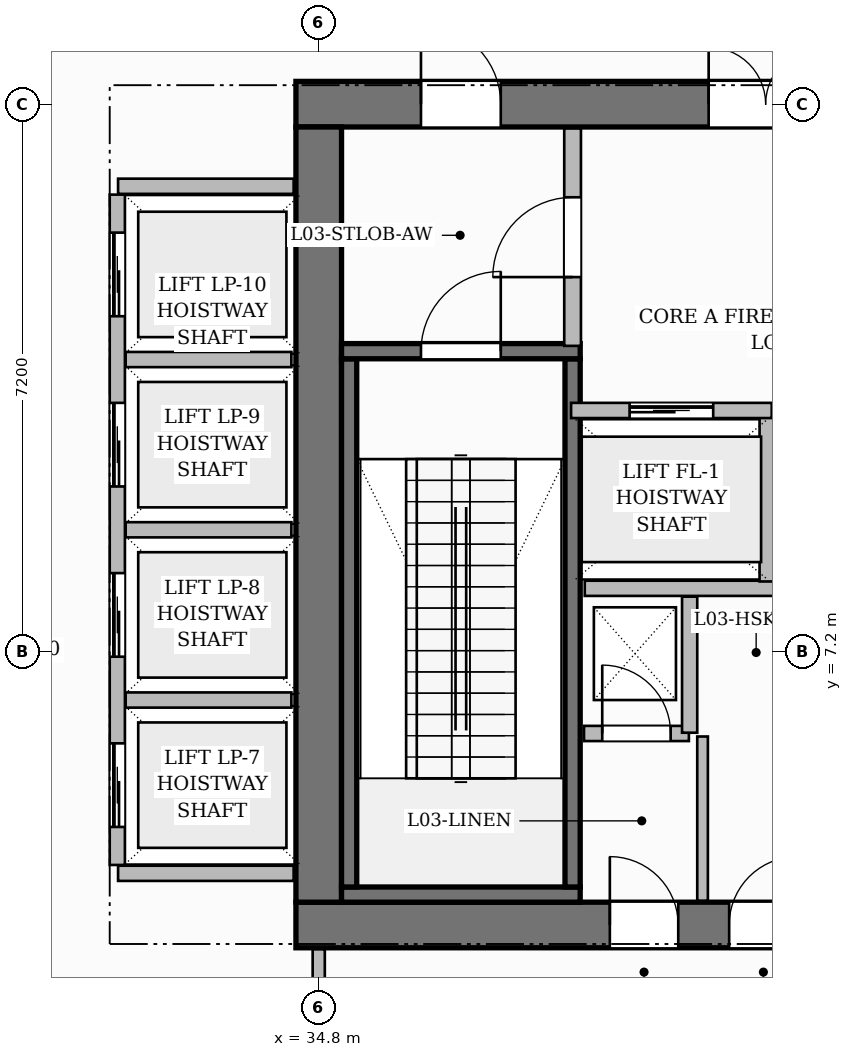
"""IFC4 building model, lengths in metres.
Left out: names, types, materials, properties, quantities, classifications, styles, units other than length and angle.
Written with IfcOpenShell. Run it as: python <this file> out.ifc"""

import sys

from ifc_helpers import new_model, si_unit, direction, frame, frame_2d, origin, place, context, subcontext, project, spatial, rectangle, extrude, source, transform, mapped, element, fill, save


model = new_model("IFC4")
c1 = context("Model", 3, precision=1e-05, world=origin(), true_north=direction((0.0, 1.0)))
c2 = subcontext(c1, "Body", "Model", "MODEL_VIEW")
j1 = project(units=[si_unit("LENGTHUNIT", "METRE"), si_unit("PLANEANGLEUNIT", "RADIAN")], contexts=[c1])
p1 = place(None, origin())
s1 = spatial("IfcSite", under=j1, at=p1, CompositionType="ELEMENT")
p2 = place(p1, origin())
s2 = spatial("IfcBuilding", under=s1, at=p2, CompositionType="ELEMENT")
p3 = place(p2, frame((0.0, 0.0, 16.2)))
s3 = spatial("IfcBuildingStorey", under=s2, at=p3, CompositionType="ELEMENT", Elevation=16.2)
p4 = place(p3, frame((34.5, 3.6, 0.0), z_axis=(0.0, 0.0, 1.0), x_axis=(1.0, 0.0, 0.0)))
e1 = element("IfcWall", 1, at=p4, inside=s3, PredefinedType="SHEAR", context=c2, shape_type="SweptSolid", body=[
    extrude(rectangle(XDim=15.6, YDim=0.6, at=frame_2d((7.8, 0.0))), origin(), (0.0, 0.0, 1.0), 5.4),
])
p5 = place(p4, frame((4.13, 0.0, 0.0)))
e2 = element("IfcOpeningElement", 2, at=p5, cuts=e1, PredefinedType="OPENING", context=c2, shape_type="SweptSolid", body=[
    extrude(rectangle(XDim=0.9, YDim=2.1, at=frame_2d((0.45, 1.05))), frame((0.0, 0.31, 0.0), z_axis=(0.0, -1.0, 0.0), x_axis=(1.0, 0.0, 0.0)), (0.0, 0.0, 1.0), 0.62),
])
p6 = place(p4, frame((5.7, 0.0, 0.0)))
e3 = element("IfcOpeningElement", 3, at=p6, cuts=e1, PredefinedType="OPENING", context=c2, shape_type="SweptSolid", body=[
    extrude(rectangle(XDim=0.9, YDim=2.1, at=frame_2d((0.45, 1.05))), frame((0.0, 0.31, 0.0), z_axis=(0.0, -1.0, 0.0), x_axis=(1.0, 0.0, 0.0)), (0.0, 0.0, 1.0), 0.62),
])
p7 = place(p4, frame((7.3, 0.0, 0.0)))
e4 = element("IfcOpeningElement", 4, at=p7, cuts=e1, PredefinedType="OPENING", context=c2, shape_type="SweptSolid", body=[
    extrude(rectangle(XDim=0.9, YDim=2.1, at=frame_2d((0.45, 1.05))), frame((0.0, 0.31, 0.0), z_axis=(0.0, -1.0, 0.0), x_axis=(1.0, 0.0, 0.0)), (0.0, 0.0, 1.0), 0.62),
])
p8 = place(p3, frame((34.5, 14.4, 0.0), z_axis=(0.0, 0.0, 1.0), x_axis=(1.0, 0.0, 0.0)))
e5 = element("IfcWall", 5, at=p8, inside=s3, PredefinedType="SHEAR", context=c2, shape_type="SweptSolid", body=[
    extrude(rectangle(XDim=15.6, YDim=0.6, at=frame_2d((7.8, 0.0))), origin(), (0.0, 0.0, 1.0), 5.4),
])
p9 = place(p8, frame((5.43, 0.0, 0.0)))
e6 = element("IfcOpeningElement", 6, at=p9, cuts=e5, PredefinedType="OPENING", context=c2, shape_type="SweptSolid", body=[
    extrude(rectangle(XDim=1.5, YDim=2.2, at=frame_2d((0.75, 1.1))), frame((0.0, 0.31, 0.0), z_axis=(0.0, -1.0, 0.0), x_axis=(1.0, 0.0, 0.0)), (0.0, 0.0, 1.0), 0.62),
])
p10 = place(p8, frame((1.645, 0.0, 0.0)))
e7 = element("IfcOpeningElement", 7, at=p10, cuts=e5, PredefinedType="OPENING", context=c2, shape_type="SweptSolid", body=[
    extrude(rectangle(XDim=1.05, YDim=2.15, at=frame_2d((0.525, 1.075))), frame((0.0, 0.31, 0.0), z_axis=(0.0, -1.0, 0.0), x_axis=(1.0, 0.0, 0.0)), (0.0, 0.0, 1.0), 0.62),
])
p11 = place(p8, frame((11.275, 0.0, 0.0)))
e8 = element("IfcOpeningElement", 8, at=p11, cuts=e5, PredefinedType="OPENING", context=c2, shape_type="SweptSolid", body=[
    extrude(rectangle(XDim=1.05, YDim=2.15, at=frame_2d((0.525, 1.075))), frame((0.0, 0.31, 0.0), z_axis=(0.0, -1.0, 0.0), x_axis=(1.0, 0.0, 0.0)), (0.0, 0.0, 1.0), 0.62),
])
p12 = place(p3, frame((34.8, 3.9, 0.0), z_axis=(0.0, 0.0, 1.0), x_axis=(0.0, 1.0, 0.0)))
e9 = element("IfcWall", 9, at=p12, inside=s3, PredefinedType="SHEAR", context=c2, shape_type="SweptSolid", body=[
    extrude(rectangle(XDim=10.2, YDim=0.6, at=frame_2d((5.1, 0.0))), origin(), (0.0, 0.0, 1.0), 5.4),
])
p13 = place(p3, frame((35.1, 4.0, 0.0), z_axis=(0.0, 0.0, 1.0), x_axis=(1.0, 0.0, 0.0)))
e10 = element("IfcWall", 10, at=p13, inside=s3, PredefinedType="SHEAR", context=c2, shape_type="SweptSolid", body=[
    extrude(rectangle(XDim=3.14, YDim=0.2, at=frame_2d((1.57, 0.0))), origin(), (0.0, 0.0, 1.0), 5.4),
])
for number, where, z_axis, x_axis in (
    (11, (35.2, 4.1, 0.0), (0.0, 0.0, 1.0), (0.0, 1.0, 0.0)),
    (12, (38.14, 4.1, 0.0), (0.0, 0.0, 1.0), (0.0, 1.0, 0.0)),
):
    element("IfcWall", number, at=place(p3, frame(where, z_axis=z_axis, x_axis=x_axis)), inside=s3, PredefinedType="SHEAR", context=c2, shape_type="SweptSolid", body=[
        extrude(rectangle(XDim=6.95, YDim=0.2, at=frame_2d((3.475, 0.0))), origin(), (0.0, 0.0, 1.0), 5.4),
    ])
p14 = place(p3, frame((35.1, 11.15, 0.0), z_axis=(0.0, 0.0, 1.0), x_axis=(1.0, 0.0, 0.0)))
e13 = element("IfcWall", 13, at=p14, inside=s3, PredefinedType="SHEAR", context=c2, shape_type="SweptSolid", body=[
    extrude(rectangle(XDim=3.14, YDim=0.2, at=frame_2d((1.57, 0.0))), origin(), (0.0, 0.0, 1.0), 5.4),
])
p15 = place(p14, frame((1.045, 0.0, 0.0)))
e14 = element("IfcOpeningElement", 14, at=p15, cuts=e13, PredefinedType="OPENING", context=c2, shape_type="SweptSolid", body=[
    extrude(rectangle(XDim=1.05, YDim=2.2, at=frame_2d((0.525, 1.1))), frame((0.0, 0.11, 0.0), z_axis=(0.0, -1.0, 0.0), x_axis=(1.0, 0.0, 0.0)), (0.0, 0.0, 1.0), 0.22),
])
p16 = place(p3, frame((38.3, 8.03, 0.0), z_axis=(0.0, 0.0, 1.0), x_axis=(1.0, 0.0, 0.0)))
e15 = element("IfcWall", 15, at=p16, inside=s3, PredefinedType="PARTITIONING", context=c2, shape_type="SweptSolid", body=[
    extrude(rectangle(XDim=4.74, YDim=0.2, at=frame_2d((2.37, 0.0))), origin(), (0.0, 0.0, 1.0), 5.1),
])
p17 = place(p3, frame((40.7, 8.12, 0.0), z_axis=(0.0, 0.0, 1.0), x_axis=(0.0, 1.0, 0.0)))
e16 = element("IfcWall", 16, at=p17, inside=s3, PredefinedType="PARTITIONING", context=c2, shape_type="SweptSolid", body=[
    extrude(rectangle(XDim=2.18, YDim=0.2, at=frame_2d((1.09, 0.0))), origin(), (0.0, 0.0, 1.0), 5.1),
])
p18 = place(p3, frame((38.14, 11.22, 0.0), z_axis=(0.0, 0.0, 1.0), x_axis=(0.0, 1.0, 0.0)))
e17 = element("IfcWall", 17, at=p18, inside=s3, PredefinedType="PARTITIONING", context=c2, shape_type="SweptSolid", body=[
    extrude(rectangle(XDim=2.86, YDim=0.22, at=frame_2d((1.43, 0.0))), origin(), (0.0, 0.0, 1.0), 5.1),
])
p19 = place(p18, frame((0.905, 0.0, 0.0)))
e18 = element("IfcOpeningElement", 18, at=p19, cuts=e17, PredefinedType="OPENING", context=c2, shape_type="SweptSolid", body=[
    extrude(rectangle(XDim=1.05, YDim=2.15, at=frame_2d((0.525, 1.075))), frame((0.0, 0.12, 0.0), z_axis=(0.0, -1.0, 0.0), x_axis=(1.0, 0.0, 0.0)), (0.0, 0.0, 1.0), 0.24),
])
p20 = place(p3, frame((38.29, 6.12, 0.0), z_axis=(0.0, 0.0, 1.0), x_axis=(1.0, 0.0, 0.0)))
e19 = element("IfcWall", 19, at=p20, inside=s3, PredefinedType="PARTITIONING", context=c2, shape_type="SweptSolid", body=[
    extrude(rectangle(XDim=1.38, YDim=0.2, at=frame_2d((0.69, 0.0))), origin(), (0.0, 0.0, 1.0), 5.1),
])
p21 = place(p20, frame((0.24, 0.0, 0.0)))
e20 = element("IfcOpeningElement", 20, at=p21, cuts=e19, PredefinedType="OPENING", context=c2, shape_type="SweptSolid", body=[
    extrude(rectangle(XDim=0.9, YDim=2.1, at=frame_2d((0.45, 1.05))), frame((0.0, 0.11, 0.0), z_axis=(0.0, -1.0, 0.0), x_axis=(1.0, 0.0, 0.0)), (0.0, 0.0, 1.0), 0.22),
])
p22 = place(p3, frame((39.68, 6.13, 0.0), z_axis=(0.0, 0.0, 1.0), x_axis=(0.0, 1.0, 0.0)))
e21 = element("IfcWall", 21, at=p22, inside=s3, PredefinedType="PARTITIONING", context=c2, shape_type="SweptSolid", body=[
    extrude(rectangle(XDim=1.79, YDim=0.2, at=frame_2d((0.895, 0.0))), origin(), (0.0, 0.0, 1.0), 5.1),
])
p23 = place(p3, frame((39.85, 3.92, 0.0), z_axis=(0.0, 0.0, 1.0), x_axis=(0.0, 1.0, 0.0)))
e22 = element("IfcWall", 22, at=p23, inside=s3, PredefinedType="PARTITIONING", context=c2, shape_type="SweptSolid", body=[
    extrude(rectangle(XDim=2.16, YDim=0.14, at=frame_2d((1.08, 0.0))), origin(), (0.0, 0.0, 1.0), 5.1),
])
for number, where, z_axis, x_axis in (
    (23, (32.16, 4.28, 0.0), (0.0, 0.0, 1.0), (1.0, 0.0, 0.0)),
    (24, (32.16, 13.32, 0.0), (0.0, 0.0, 1.0), (1.0, 0.0, 0.0)),
):
    element("IfcWall", number, at=place(p3, frame(where, z_axis=z_axis, x_axis=x_axis)), inside=s3, PredefinedType="PARTITIONING", context=c2, shape_type="SweptSolid", body=[
        extrude(rectangle(XDim=2.31, YDim=0.2, at=frame_2d((1.155, 0.0))), origin(), (0.0, 0.0, 1.0), 5.1),
    ])
p24 = place(p3, frame((32.15, 4.39, 0.0), z_axis=(0.0, 0.0, 1.0), x_axis=(0.0, 1.0, 0.0)))
e25 = element("IfcWall", 25, at=p24, inside=s3, PredefinedType="PARTITIONING", context=c2, shape_type="SweptSolid", body=[
    extrude(rectangle(XDim=8.82, YDim=0.2, at=frame_2d((4.41, 0.0))), origin(), (0.0, 0.0, 1.0), 5.1),
])
p25 = place(p24, frame((0.5, 0.0, 0.0)))
e26 = element("IfcOpeningElement", 26, at=p25, cuts=e25, PredefinedType="OPENING", context=c2, shape_type="SweptSolid", body=[
    extrude(rectangle(XDim=1.1, YDim=2.2, at=frame_2d((0.55, 1.1))), frame((0.0, 0.11, 0.0), z_axis=(0.0, -1.0, 0.0), x_axis=(1.0, 0.0, 0.0)), (0.0, 0.0, 1.0), 0.22),
])
p26 = place(p24, frame((2.74, 0.0, 0.0)))
e27 = element("IfcOpeningElement", 27, at=p26, cuts=e25, PredefinedType="OPENING", context=c2, shape_type="SweptSolid", body=[
    extrude(rectangle(XDim=1.1, YDim=2.2, at=frame_2d((0.55, 1.1))), frame((0.0, 0.11, 0.0), z_axis=(0.0, -1.0, 0.0), x_axis=(1.0, 0.0, 0.0)), (0.0, 0.0, 1.0), 0.22),
])
p27 = place(p24, frame((4.98, 0.0, 0.0)))
e28 = element("IfcOpeningElement", 28, at=p27, cuts=e25, PredefinedType="OPENING", context=c2, shape_type="SweptSolid", body=[
    extrude(rectangle(XDim=1.1, YDim=2.2, at=frame_2d((0.55, 1.1))), frame((0.0, 0.11, 0.0), z_axis=(0.0, -1.0, 0.0), x_axis=(1.0, 0.0, 0.0)), (0.0, 0.0, 1.0), 0.22),
])
p28 = place(p24, frame((7.22, 0.0, 0.0)))
e29 = element("IfcOpeningElement", 29, at=p28, cuts=e25, PredefinedType="OPENING", context=c2, shape_type="SweptSolid", body=[
    extrude(rectangle(XDim=1.1, YDim=2.2, at=frame_2d((0.55, 1.1))), frame((0.0, 0.11, 0.0), z_axis=(0.0, -1.0, 0.0), x_axis=(1.0, 0.0, 0.0)), (0.0, 0.0, 1.0), 0.22),
])
for number, where, z_axis, x_axis in (
    (30, (32.26, 6.56, 0.0), (0.0, 0.0, 1.0), (1.0, 0.0, 0.0)),
    (31, (32.26, 8.8, 0.0), (0.0, 0.0, 1.0), (1.0, 0.0, 0.0)),
    (32, (32.26, 11.04, 0.0), (0.0, 0.0, 1.0), (1.0, 0.0, 0.0)),
):
    element("IfcWall", number, at=place(p3, frame(where, z_axis=z_axis, x_axis=x_axis)), inside=s3, PredefinedType="PARTITIONING", context=c2, shape_type="SweptSolid", body=[
        extrude(rectangle(XDim=2.18, YDim=0.2, at=frame_2d((1.09, 0.0))), origin(), (0.0, 0.0, 1.0), 5.1),
    ])
p29 = place(p3, frame((34.8, 0.32, 0.0), z_axis=(0.0, 0.0, 1.0), x_axis=(0.0, 1.0, 0.0)))
e33 = element("IfcWall", 33, at=p29, inside=s3, PredefinedType="PARTITIONING", context=c2, shape_type="SweptSolid", body=[
    extrude(rectangle(XDim=2.96, YDim=0.16, at=frame_2d((1.48, 0.0))), origin(), (0.0, 0.0, 1.0), 5.1),
])
p30 = place(p29, frame((0.955, 0.0, 0.0)))
e34 = element("IfcOpeningElement", 34, at=p30, cuts=e33, PredefinedType="OPENING", context=c2, shape_type="SweptSolid", body=[
    extrude(rectangle(XDim=1.05, YDim=2.15, at=frame_2d((0.525, 1.075))), frame((0.0, 0.09, 0.0), z_axis=(0.0, -1.0, 0.0), x_axis=(1.0, 0.0, 0.0)), (0.0, 0.0, 1.0), 0.18),
])
p31 = place(p3, frame((38.12, 10.37, 0.0), z_axis=(0.0, 0.0, 1.0), x_axis=(1.0, 0.0, 0.0)))
e35 = element("IfcWall", 35, at=p31, inside=s3, PredefinedType="PARTITIONING", context=c2, shape_type="SweptSolid", body=[
    extrude(rectangle(XDim=2.64, YDim=0.2, at=frame_2d((1.32, 0.0))), origin(), (0.0, 0.0, 1.0), 5.1),
])
p32 = place(p31, frame((0.77, 0.0, 0.0)))
e36 = element("IfcOpeningElement", 36, at=p32, cuts=e35, PredefinedType="OPENING", context=c2, shape_type="SweptSolid", body=[
    extrude(rectangle(XDim=1.1, YDim=2.2, at=frame_2d((0.55, 1.1))), frame((0.0, 0.11, 0.0), z_axis=(0.0, -1.0, 0.0), x_axis=(1.0, 0.0, 0.0)), (0.0, 0.0, 1.0), 0.22),
])
m1 = source(origin(), c2, "Body", "SweptSolid", [
    extrude(rectangle(XDim=1.05, YDim=2.2, at=frame_2d((0.525, 1.1))), frame((0.0, 0.025, 0.0), z_axis=(0.0, -1.0, 0.0), x_axis=(1.0, 0.0, 0.0)), (0.0, 0.0, 1.0), 0.05),
])
p33 = place(p15, origin())
e37 = element("IfcDoor", 37, at=p33, inside=s3, OperationType="SINGLE_SWING_RIGHT", PredefinedType="DOOR", context=c2, shape_type="MappedRepresentation", body=[
    mapped(m1, transform((0.0, 0.0, 0.0), scale=1.0)),
])
fill(e14, e37)
m2 = source(origin(), c2, "Body", "SweptSolid", [
    extrude(rectangle(XDim=1.05, YDim=2.15, at=frame_2d((0.525, 1.075))), frame((0.0, 0.025, 0.0), z_axis=(0.0, -1.0, 0.0), x_axis=(1.0, 0.0, 0.0)), (0.0, 0.0, 1.0), 0.05),
])
p34 = place(p19, origin())
e38 = element("IfcDoor", 38, at=p34, inside=s3, OperationType="SINGLE_SWING_LEFT", PredefinedType="DOOR", context=c2, shape_type="MappedRepresentation", body=[
    mapped(m2, transform((0.0, 0.0, 0.0), scale=1.0)),
])
fill(e18, e38)
m3 = source(origin(), c2, "Body", "SweptSolid", [
    extrude(rectangle(XDim=1.5, YDim=2.2, at=frame_2d((0.75, 1.1))), frame((0.0, 0.025, 0.0), z_axis=(0.0, -1.0, 0.0), x_axis=(1.0, 0.0, 0.0)), (0.0, 0.0, 1.0), 0.05),
])
p35 = place(p9, origin())
e39 = element("IfcDoor", 39, at=p35, inside=s3, OperationType="DOUBLE_DOOR_SINGLE_SWING", PredefinedType="DOOR", context=c2, shape_type="MappedRepresentation", body=[
    mapped(m3, transform((0.0, 0.0, 0.0), scale=1.0)),
])
fill(e6, e39)
p36 = place(p10, origin())
e40 = element("IfcDoor", 40, at=p36, inside=s3, OperationType="SINGLE_SWING_LEFT", PredefinedType="DOOR", context=c2, shape_type="MappedRepresentation", body=[
    mapped(m2, transform((0.0, 0.0, 0.0), scale=1.0)),
])
fill(e7, e40)
m4 = source(origin(), c2, "Body", "SweptSolid", [
    extrude(rectangle(XDim=0.9, YDim=2.1, at=frame_2d((0.45, 1.05))), frame((0.0, 0.025, 0.0), z_axis=(0.0, -1.0, 0.0), x_axis=(1.0, 0.0, 0.0)), (0.0, 0.0, 1.0), 0.05),
])
p37 = place(p21, origin())
e41 = element("IfcDoor", 41, at=p37, inside=s3, OperationType="SINGLE_SWING_LEFT", PredefinedType="DOOR", context=c2, shape_type="MappedRepresentation", body=[
    mapped(m4, transform((0.0, 0.0, 0.0), scale=1.0)),
])
fill(e20, e41)
p38 = place(p5, origin())
e42 = element("IfcDoor", 42, at=p38, inside=s3, OperationType="SINGLE_SWING_LEFT", PredefinedType="DOOR", context=c2, shape_type="MappedRepresentation", body=[
    mapped(m4, transform((0.0, 0.0, 0.0), scale=1.0)),
])
fill(e2, e42)
p39 = place(p6, origin())
e43 = element("IfcDoor", 43, at=p39, inside=s3, OperationType="SINGLE_SWING_RIGHT", PredefinedType="DOOR", context=c2, shape_type="MappedRepresentation", body=[
    mapped(m4, transform((0.0, 0.0, 0.0), scale=1.0)),
])
fill(e3, e43)
m5 = source(origin(), c2, "Body", "SweptSolid", [
    extrude(rectangle(XDim=1.1, YDim=2.2, at=frame_2d((0.55, 1.1))), frame((0.0, 0.025, 0.0), z_axis=(0.0, -1.0, 0.0), x_axis=(1.0, 0.0, 0.0)), (0.0, 0.0, 1.0), 0.05),
])
p40 = place(p32, origin())
e44 = element("IfcDoor", 44, at=p40, inside=s3, OperationType="SLIDING_TO_LEFT", PredefinedType="DOOR", context=c2, shape_type="MappedRepresentation", body=[
    mapped(m5, transform((0.0, 0.0, 0.0), scale=1.0)),
])
fill(e36, e44)
p41 = place(p25, origin())
e45 = element("IfcDoor", 45, at=p41, inside=s3, OperationType="SLIDING_TO_LEFT", PredefinedType="DOOR", context=c2, shape_type="MappedRepresentation", body=[
    mapped(m5, transform((0.0, 0.0, 0.0), scale=1.0)),
])
fill(e26, e45)
p42 = place(p26, origin())
e46 = element("IfcDoor", 46, at=p42, inside=s3, OperationType="SLIDING_TO_LEFT", PredefinedType="DOOR", context=c2, shape_type="MappedRepresentation", body=[
    mapped(m5, transform((0.0, 0.0, 0.0), scale=1.0)),
])
fill(e27, e46)
p43 = place(p27, origin())
e47 = element("IfcDoor", 47, at=p43, inside=s3, OperationType="SLIDING_TO_LEFT", PredefinedType="DOOR", context=c2, shape_type="MappedRepresentation", body=[
    mapped(m5, transform((0.0, 0.0, 0.0), scale=1.0)),
])
fill(e28, e47)
p44 = place(p28, origin())
e48 = element("IfcDoor", 48, at=p44, inside=s3, OperationType="SLIDING_TO_LEFT", PredefinedType="DOOR", context=c2, shape_type="MappedRepresentation", body=[
    mapped(m5, transform((0.0, 0.0, 0.0), scale=1.0)),
])
fill(e29, e48)
save(model, sys.argv[1])
